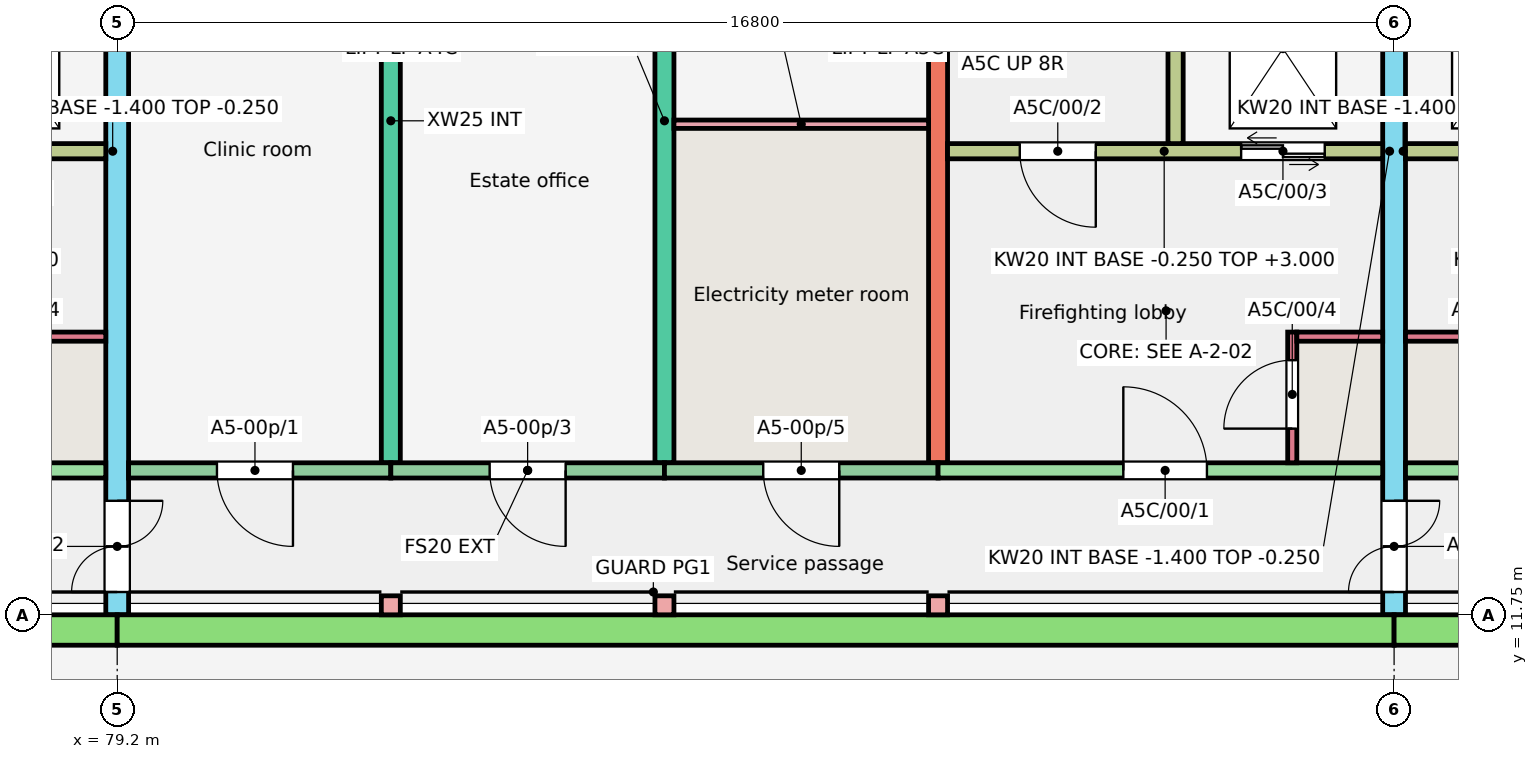
"""IFC4 building model, lengths in metres.
Left out: names, types, materials, properties, quantities, classifications, styles, units other than length and angle.
Written with IfcOpenShell. Run it as: python <this file> out.ifc"""

import sys

from ifc_helpers import new_model, si_unit, direction, frame, frame_2d, origin, origin_2d, place, context, subcontext, project, spatial, rectangle, extrude, element, fill, save


model = new_model("IFC4")
c1 = context("Model", 3, precision=1e-05, world=origin(), true_north=direction((0.0, 1.0)))
c2 = subcontext(c1, "Body", "Model", "MODEL_VIEW")
j1 = project(units=[si_unit("LENGTHUNIT", "METRE"), si_unit("PLANEANGLEUNIT", "RADIAN")], contexts=[c1])
p1 = place(None, origin())
s1 = spatial("IfcSite", under=j1, at=p1, CompositionType="ELEMENT")
p2 = place(p1, origin())
s2 = spatial("IfcBuilding", under=s1, at=p2, CompositionType="ELEMENT")
p3 = place(p2, origin())
s3 = spatial("IfcBuildingStorey", under=s2, at=p3, CompositionType="ELEMENT", Elevation=0.0)
p4 = place(p3, frame((79.2, 11.75, -0.25), z_axis=(0.0, 0.0, 1.0), x_axis=(0.0, 1.0, 0.0)))
e1 = element("IfcWall", 1, at=p4, inside=s3, PredefinedType="SHEAR", context=c2, shape_type="SweptSolid", body=[
    extrude(rectangle(XDim=11.0, YDim=0.3, at=frame_2d((5.5, 0.0))), origin(), (0.0, 0.0, 1.0), 3.25),
])
p5 = place(p4, frame((0.3, 0.0, 0.25)))
e2 = element("IfcOpeningElement", 2, at=p5, cuts=e1, PredefinedType="OPENING", context=c2, shape_type="SweptSolid", body=[
    extrude(rectangle(XDim=1.2, YDim=2.1, at=frame_2d((0.6, 1.05))), frame((0.0, 0.16, 0.0), z_axis=(0.0, -1.0, 0.0), x_axis=(1.0, 0.0, 0.0)), (0.0, 0.0, 1.0), 0.32),
])
for number, where, z_axis, x_axis in (
    (3, (82.8, 13.75, -0.25), (0.0, 0.0, 1.0), (0.0, 1.0, 0.0)),
    (4, (86.4, 13.75, -0.25), (0.0, 0.0, 1.0), (0.0, 1.0, 0.0)),
    (5, (90.0, 13.75, -0.25), (0.0, 0.0, 1.0), (0.0, 1.0, 0.0)),
):
    element("IfcWall", number, at=place(p3, frame(where, z_axis=z_axis, x_axis=x_axis)), inside=s3, PredefinedType="SHEAR", context=c2, shape_type="SweptSolid", body=[
        extrude(rectangle(XDim=9.0, YDim=0.25, at=frame_2d((4.5, 0.0))), origin(), (0.0, 0.0, 1.0), 3.25),
    ])
p6 = place(p3, frame((96.0, 11.75, -0.25), z_axis=(0.0, 0.0, 1.0), x_axis=(0.0, 1.0, 0.0)))
e6 = element("IfcWall", 6, at=p6, inside=s3, PredefinedType="SHEAR", context=c2, shape_type="SweptSolid", body=[
    extrude(rectangle(XDim=11.0, YDim=0.3, at=frame_2d((5.5, 0.0))), origin(), (0.0, 0.0, 1.0), 3.25),
])
p7 = place(p6, frame((0.3, 0.0, 0.25)))
e7 = element("IfcOpeningElement", 7, at=p7, cuts=e6, PredefinedType="OPENING", context=c2, shape_type="SweptSolid", body=[
    extrude(rectangle(XDim=1.2, YDim=2.1, at=frame_2d((0.6, 1.05))), frame((0.0, 0.16, 0.0), z_axis=(0.0, -1.0, 0.0), x_axis=(1.0, 0.0, 0.0)), (0.0, 0.0, 1.0), 0.32),
])
p8 = place(p3, frame((73.2, 13.65, -0.25), z_axis=(0.0, 0.0, 1.0), x_axis=(1.0, 0.0, 0.0)))
e8 = element("IfcWall", 8, at=p8, inside=s3, PredefinedType="SHEAR", context=c2, shape_type="SweptSolid", body=[
    extrude(rectangle(XDim=5.85, YDim=0.2, at=frame_2d((2.925, 0.0))), origin(), (0.0, 0.0, 1.0), 3.25),
])
p9 = place(p8, frame((2.438, 0.0, 0.25)))
e9 = element("IfcOpeningElement", 9, at=p9, cuts=e8, PredefinedType="OPENING", context=c2, shape_type="SweptSolid", body=[
    extrude(rectangle(XDim=1.1, YDim=2.1, at=frame_2d((0.55, 1.05))), frame((0.0, 0.11, 0.0), z_axis=(0.0, -1.0, 0.0), x_axis=(1.0, 0.0, 0.0)), (0.0, 0.0, 1.0), 0.22),
])
p10 = place(p3, frame((73.325, 17.85, -0.25), z_axis=(0.0, 0.0, 1.0), x_axis=(1.0, 0.0, 0.0)))
e10 = element("IfcWall", 10, at=p10, inside=s3, PredefinedType="SHEAR", context=c2, shape_type="SweptSolid", body=[
    extrude(rectangle(XDim=5.725, YDim=0.2, at=frame_2d((2.863, 0.0))), origin(), (0.0, 0.0, 1.0), 3.25),
])
p11 = place(p10, frame((0.95, 0.0, 0.25)))
e11 = element("IfcOpeningElement", 11, at=p11, cuts=e10, PredefinedType="OPENING", context=c2, shape_type="SweptSolid", body=[
    extrude(rectangle(XDim=1.0, YDim=2.1, at=frame_2d((0.5, 1.05))), frame((0.0, 0.11, 0.0), z_axis=(0.0, -1.0, 0.0), x_axis=(1.0, 0.0, 0.0)), (0.0, 0.0, 1.0), 0.22),
])
p12 = place(p10, frame((3.863, 0.0, 0.25)))
e12 = element("IfcOpeningElement", 12, at=p12, cuts=e10, PredefinedType="OPENING", context=c2, shape_type="SweptSolid", body=[
    extrude(rectangle(XDim=1.1, YDim=2.1, at=frame_2d((0.55, 1.05))), frame((0.0, 0.11, 0.0), z_axis=(0.0, -1.0, 0.0), x_axis=(1.0, 0.0, 0.0)), (0.0, 0.0, 1.0), 0.22),
])
p13 = place(p3, frame((77.92, 15.41, -0.25), z_axis=(0.0, 0.0, 1.0), x_axis=(1.0, 0.0, 0.0)))
e13 = element("IfcWall", 13, at=p13, inside=s3, PredefinedType="SHEAR", context=c2, shape_type="SweptSolid", body=[
    extrude(rectangle(XDim=1.13, YDim=0.12, at=frame_2d((0.565, 0.0))), origin(), (0.0, 0.0, 1.0), 3.25),
])
p14 = place(p3, frame((79.35, 13.65, -0.25), z_axis=(0.0, 0.0, 1.0), x_axis=(1.0, 0.0, 0.0)))
e14 = element("IfcWall", 14, at=p14, inside=s3, PredefinedType="SOLIDWALL", context=c2, shape_type="SweptSolid", body=[
    extrude(rectangle(XDim=3.45, YDim=0.2, at=frame_2d((1.725, 0.0))), origin(), (0.0, 0.0, 1.0), 3.25),
])
p15 = place(p14, frame((1.163, 0.0, 0.25)))
e15 = element("IfcOpeningElement", 15, at=p15, cuts=e14, PredefinedType="OPENING", context=c2, shape_type="SweptSolid", body=[
    extrude(rectangle(XDim=1.0, YDim=2.1, at=frame_2d((0.5, 1.05))), frame((0.0, 0.11, 0.0), z_axis=(0.0, -1.0, 0.0), x_axis=(1.0, 0.0, 0.0)), (0.0, 0.0, 1.0), 0.22),
])
p16 = place(p3, frame((82.8, 13.65, -0.25), z_axis=(0.0, 0.0, 1.0), x_axis=(1.0, 0.0, 0.0)))
e16 = element("IfcWall", 16, at=p16, inside=s3, PredefinedType="SOLIDWALL", context=c2, shape_type="SweptSolid", body=[
    extrude(rectangle(XDim=3.6, YDim=0.2, at=frame_2d((1.8, 0.0))), origin(), (0.0, 0.0, 1.0), 3.25),
])
p17 = place(p16, frame((1.3, 0.0, 0.25)))
e17 = element("IfcOpeningElement", 17, at=p17, cuts=e16, PredefinedType="OPENING", context=c2, shape_type="SweptSolid", body=[
    extrude(rectangle(XDim=1.0, YDim=2.1, at=frame_2d((0.5, 1.05))), frame((0.0, 0.11, 0.0), z_axis=(0.0, -1.0, 0.0), x_axis=(1.0, 0.0, 0.0)), (0.0, 0.0, 1.0), 0.22),
])
p18 = place(p3, frame((86.4, 13.65, -0.25), z_axis=(0.0, 0.0, 1.0), x_axis=(1.0, 0.0, 0.0)))
e18 = element("IfcWall", 18, at=p18, inside=s3, PredefinedType="SOLIDWALL", context=c2, shape_type="SweptSolid", body=[
    extrude(rectangle(XDim=3.6, YDim=0.2, at=frame_2d((1.8, 0.0))), origin(), (0.0, 0.0, 1.0), 3.25),
])
p19 = place(p18, frame((1.3, 0.0, 0.25)))
e19 = element("IfcOpeningElement", 19, at=p19, cuts=e18, PredefinedType="OPENING", context=c2, shape_type="SweptSolid", body=[
    extrude(rectangle(XDim=1.0, YDim=2.1, at=frame_2d((0.5, 1.05))), frame((0.0, 0.11, 0.0), z_axis=(0.0, -1.0, 0.0), x_axis=(1.0, 0.0, 0.0)), (0.0, 0.0, 1.0), 0.22),
])
p20 = place(p3, frame((90.0, 13.65, -0.25), z_axis=(0.0, 0.0, 1.0), x_axis=(1.0, 0.0, 0.0)))
e20 = element("IfcWall", 20, at=p20, inside=s3, PredefinedType="SHEAR", context=c2, shape_type="SweptSolid", body=[
    extrude(rectangle(XDim=5.85, YDim=0.2, at=frame_2d((2.925, 0.0))), origin(), (0.0, 0.0, 1.0), 3.25),
])
p21 = place(p20, frame((2.438, 0.0, 0.25)))
e21 = element("IfcOpeningElement", 21, at=p21, cuts=e20, PredefinedType="OPENING", context=c2, shape_type="SweptSolid", body=[
    extrude(rectangle(XDim=1.1, YDim=2.1, at=frame_2d((0.55, 1.05))), frame((0.0, 0.11, 0.0), z_axis=(0.0, -1.0, 0.0), x_axis=(1.0, 0.0, 0.0)), (0.0, 0.0, 1.0), 0.22),
])
p22 = place(p3, frame((90.125, 17.85, -0.25), z_axis=(0.0, 0.0, 1.0), x_axis=(1.0, 0.0, 0.0)))
e22 = element("IfcWall", 22, at=p22, inside=s3, PredefinedType="SHEAR", context=c2, shape_type="SweptSolid", body=[
    extrude(rectangle(XDim=5.725, YDim=0.2, at=frame_2d((2.863, 0.0))), origin(), (0.0, 0.0, 1.0), 3.25),
])
p23 = place(p22, frame((0.95, 0.0, 0.25)))
e23 = element("IfcOpeningElement", 23, at=p23, cuts=e22, PredefinedType="OPENING", context=c2, shape_type="SweptSolid", body=[
    extrude(rectangle(XDim=1.0, YDim=2.1, at=frame_2d((0.5, 1.05))), frame((0.0, 0.11, 0.0), z_axis=(0.0, -1.0, 0.0), x_axis=(1.0, 0.0, 0.0)), (0.0, 0.0, 1.0), 0.22),
])
p24 = place(p22, frame((3.863, 0.0, 0.25)))
e24 = element("IfcOpeningElement", 24, at=p24, cuts=e22, PredefinedType="OPENING", context=c2, shape_type="SweptSolid", body=[
    extrude(rectangle(XDim=1.1, YDim=2.1, at=frame_2d((0.55, 1.05))), frame((0.0, 0.11, 0.0), z_axis=(0.0, -1.0, 0.0), x_axis=(1.0, 0.0, 0.0)), (0.0, 0.0, 1.0), 0.22),
])
p25 = place(p3, frame((93.125, 17.95, -0.25), z_axis=(0.0, 0.0, 1.0), x_axis=(0.0, 1.0, 0.0)))
e25 = element("IfcWall", 25, at=p25, inside=s3, PredefinedType="SHEAR", context=c2, shape_type="SweptSolid", body=[
    extrude(rectangle(XDim=4.8, YDim=0.2, at=frame_2d((2.4, 0.0))), origin(), (0.0, 0.0, 1.0), 3.25),
])
p26 = place(p3, frame((94.66, 13.75, -0.25), z_axis=(0.0, 0.0, 1.0), x_axis=(0.0, 1.0, 0.0)))
e26 = element("IfcWall", 26, at=p26, inside=s3, PredefinedType="SHEAR", context=c2, shape_type="SweptSolid", body=[
    extrude(rectangle(XDim=1.72, YDim=0.12, at=frame_2d((0.86, 0.0))), origin(), (0.0, 0.0, 1.0), 3.25),
])
p27 = place(p26, frame((0.45, 0.0, 0.25)))
e27 = element("IfcOpeningElement", 27, at=p27, cuts=e26, PredefinedType="OPENING", context=c2, shape_type="SweptSolid", body=[
    extrude(rectangle(XDim=0.9, YDim=2.1, at=frame_2d((0.45, 1.05))), frame((0.0, 0.07, 0.0), z_axis=(0.0, -1.0, 0.0), x_axis=(1.0, 0.0, 0.0)), (0.0, 0.0, 1.0), 0.14),
])
p28 = place(p3, frame((94.72, 15.41, -0.25), z_axis=(0.0, 0.0, 1.0), x_axis=(1.0, 0.0, 0.0)))
e28 = element("IfcWall", 28, at=p28, inside=s3, PredefinedType="SHEAR", context=c2, shape_type="SweptSolid", body=[
    extrude(rectangle(XDim=1.13, YDim=0.12, at=frame_2d((0.565, 0.0))), origin(), (0.0, 0.0, 1.0), 3.25),
])
p29 = place(p3, frame((96.15, 13.65, -0.25), z_axis=(0.0, 0.0, 1.0), x_axis=(1.0, 0.0, 0.0)))
e29 = element("IfcWall", 29, at=p29, inside=s3, PredefinedType="SHEAR", context=c2, shape_type="SweptSolid", body=[
    extrude(rectangle(XDim=5.85, YDim=0.2, at=frame_2d((2.925, 0.0))), origin(), (0.0, 0.0, 1.0), 3.25),
])
p30 = place(p29, frame((2.312, 0.0, 0.25)))
e30 = element("IfcOpeningElement", 30, at=p30, cuts=e29, PredefinedType="OPENING", context=c2, shape_type="SweptSolid", body=[
    extrude(rectangle(XDim=1.1, YDim=2.1, at=frame_2d((0.55, 1.05))), frame((0.0, 0.11, 0.0), z_axis=(0.0, -1.0, 0.0), x_axis=(1.0, 0.0, 0.0)), (0.0, 0.0, 1.0), 0.22),
])
p31 = place(p3, frame((96.15, 17.85, -0.25), z_axis=(0.0, 0.0, 1.0), x_axis=(1.0, 0.0, 0.0)))
e31 = element("IfcWall", 31, at=p31, inside=s3, PredefinedType="SHEAR", context=c2, shape_type="SweptSolid", body=[
    extrude(rectangle(XDim=5.725, YDim=0.2, at=frame_2d((2.863, 0.0))), origin(), (0.0, 0.0, 1.0), 3.25),
])
p32 = place(p31, frame((3.775, 0.0, 0.25)))
e32 = element("IfcOpeningElement", 32, at=p32, cuts=e31, PredefinedType="OPENING", context=c2, shape_type="SweptSolid", body=[
    extrude(rectangle(XDim=1.0, YDim=2.1, at=frame_2d((0.5, 1.05))), frame((0.0, 0.11, 0.0), z_axis=(0.0, -1.0, 0.0), x_axis=(1.0, 0.0, 0.0)), (0.0, 0.0, 1.0), 0.22),
])
p33 = place(p31, frame((0.762, 0.0, 0.25)))
e33 = element("IfcOpeningElement", 33, at=p33, cuts=e31, PredefinedType="OPENING", context=c2, shape_type="SweptSolid", body=[
    extrude(rectangle(XDim=1.1, YDim=2.1, at=frame_2d((0.55, 1.05))), frame((0.0, 0.11, 0.0), z_axis=(0.0, -1.0, 0.0), x_axis=(1.0, 0.0, 0.0)), (0.0, 0.0, 1.0), 0.22),
])
p34 = place(p3, frame((96.15, 15.41, -0.25), z_axis=(0.0, 0.0, 1.0), x_axis=(1.0, 0.0, 0.0)))
e34 = element("IfcWall", 34, at=p34, inside=s3, PredefinedType="SHEAR", context=c2, shape_type="SweptSolid", body=[
    extrude(rectangle(XDim=1.13, YDim=0.12, at=frame_2d((0.565, 0.0))), origin(), (0.0, 0.0, 1.0), 3.25),
])
for number, where, z_axis, x_axis in (
    (35, (82.8, 11.875, -0.25), (0.0, 0.0, 1.0), (1.0, 0.0, 0.0)),
    (36, (86.4, 11.875, -0.25), (0.0, 0.0, 1.0), (1.0, 0.0, 0.0)),
    (37, (90.0, 11.875, -0.25), (0.0, 0.0, 1.0), (1.0, 0.0, 0.0)),
):
    element("IfcColumn", number, at=place(p3, frame(where, z_axis=z_axis, x_axis=x_axis)), inside=s3, PredefinedType="COLUMN", context=c2, shape_type="SweptSolid", body=[
        extrude(rectangle(XDim=0.25, YDim=0.25, at=origin_2d()), origin(), (0.0, 0.0, 1.0), 3.25),
    ])
p35 = place(p3, frame((76.225, 17.85, -1.4), z_axis=(0.0, 0.0, 1.0), x_axis=(1.0, 0.0, 0.0)))
e38 = element("IfcWall", 38, at=p35, inside=s3, PredefinedType="SHEAR", context=c2, shape_type="SweptSolid", body=[
    extrude(rectangle(XDim=2.975, YDim=0.2, at=frame_2d((1.487, 0.0))), origin(), (0.0, 0.0, 1.0), 1.15),
])
p36 = place(p3, frame((79.125, 17.95, -1.4), z_axis=(0.0, 0.0, 1.0), x_axis=(0.0, 1.0, 0.0)))
e39 = element("IfcWall", 39, at=p36, inside=s3, PredefinedType="SHEAR", context=c2, shape_type="SweptSolid", body=[
    extrude(rectangle(XDim=3.0, YDim=0.15, at=frame_2d((1.5, 0.0))), origin(), (0.0, 0.0, 1.0), 1.15),
])
p37 = place(p3, frame((93.025, 17.85, -1.4), z_axis=(0.0, 0.0, 1.0), x_axis=(1.0, 0.0, 0.0)))
e40 = element("IfcWall", 40, at=p37, inside=s3, PredefinedType="SHEAR", context=c2, shape_type="SweptSolid", body=[
    extrude(rectangle(XDim=2.975, YDim=0.2, at=frame_2d((1.488, 0.0))), origin(), (0.0, 0.0, 1.0), 1.15),
])
p38 = place(p3, frame((93.125, 17.95, -1.4), z_axis=(0.0, 0.0, 1.0), x_axis=(0.0, 1.0, 0.0)))
e41 = element("IfcWall", 41, at=p38, inside=s3, PredefinedType="SHEAR", context=c2, shape_type="SweptSolid", body=[
    extrude(rectangle(XDim=3.0, YDim=0.2, at=frame_2d((1.5, 0.0))), origin(), (0.0, 0.0, 1.0), 1.15),
])
p39 = place(p3, frame((95.925, 17.95, -1.4), z_axis=(0.0, 0.0, 1.0), x_axis=(0.0, 1.0, 0.0)))
e42 = element("IfcWall", 42, at=p39, inside=s3, PredefinedType="SHEAR", context=c2, shape_type="SweptSolid", body=[
    extrude(rectangle(XDim=3.0, YDim=0.15, at=frame_2d((1.5, 0.0))), origin(), (0.0, 0.0, 1.0), 1.15),
])
p40 = place(p3, frame((96.0, 17.85, -1.4), z_axis=(0.0, 0.0, 1.0), x_axis=(1.0, 0.0, 0.0)))
e43 = element("IfcWall", 43, at=p40, inside=s3, PredefinedType="SHEAR", context=c2, shape_type="SweptSolid", body=[
    extrude(rectangle(XDim=2.975, YDim=0.2, at=frame_2d((1.488, 0.0))), origin(), (0.0, 0.0, 1.0), 1.15),
])
p41 = place(p3, frame((96.075, 17.95, -1.4), z_axis=(0.0, 0.0, 1.0), x_axis=(0.0, 1.0, 0.0)))
e44 = element("IfcWall", 44, at=p41, inside=s3, PredefinedType="SHEAR", context=c2, shape_type="SweptSolid", body=[
    extrude(rectangle(XDim=3.0, YDim=0.15, at=frame_2d((1.5, 0.0))), origin(), (0.0, 0.0, 1.0), 1.15),
])
for number, where, z_axis, x_axis in (
    (45, (62.4, 11.55, -0.25), (0.0, 0.0, 1.0), (1.0, 0.0, 0.0)),
    (46, (79.2, 11.55, -0.25), (0.0, 0.0, 1.0), (1.0, 0.0, 0.0)),
    (47, (96.0, 11.55, -0.25), (0.0, 0.0, 1.0), (1.0, 0.0, 0.0)),
):
    element("IfcWall", number, at=place(p3, frame(where, z_axis=z_axis, x_axis=x_axis)), inside=s3, PredefinedType="SOLIDWALL", context=c2, shape_type="SweptSolid", body=[
        extrude(rectangle(XDim=16.8, YDim=0.4, at=frame_2d((8.4, 0.0))), origin(), (0.0, 0.0, 1.0), 3.25),
    ])
p42 = place(p3, frame((86.525, 18.205, 0.0), z_axis=(0.0, 0.0, 1.0), x_axis=(1.0, 0.0, 0.0)))
e48 = element("IfcWall", 48, at=p42, inside=s3, PredefinedType="PARTITIONING", context=c2, shape_type="SweptSolid", body=[
    extrude(rectangle(XDim=3.35, YDim=0.11, at=frame_2d((1.675, 0.0))), origin(), (0.0, 0.0, 1.0), 2.8),
])
p43 = place(p15, origin())
e49 = element("IfcDoor", 49, at=p43, inside=s3, OperationType="SINGLE_SWING_RIGHT", PredefinedType="DOOR", context=c2, shape_type="SweptSolid", body=[
    extrude(rectangle(XDim=1.0, YDim=2.1, at=frame_2d((0.5, 1.05))), frame((0.0, 0.025, 0.0), z_axis=(0.0, -1.0, 0.0), x_axis=(1.0, 0.0, 0.0)), (0.0, 0.0, 1.0), 0.05),
])
fill(e15, e49)
p44 = place(p17, origin())
e50 = element("IfcDoor", 50, at=p44, inside=s3, OperationType="SINGLE_SWING_RIGHT", PredefinedType="DOOR", context=c2, shape_type="SweptSolid", body=[
    extrude(rectangle(XDim=1.0, YDim=2.1, at=frame_2d((0.5, 1.05))), frame((0.0, 0.025, 0.0), z_axis=(0.0, -1.0, 0.0), x_axis=(1.0, 0.0, 0.0)), (0.0, 0.0, 1.0), 0.05),
])
fill(e17, e50)
p45 = place(p19, origin())
e51 = element("IfcDoor", 51, at=p45, inside=s3, OperationType="SINGLE_SWING_RIGHT", PredefinedType="DOOR", context=c2, shape_type="SweptSolid", body=[
    extrude(rectangle(XDim=1.0, YDim=2.1, at=frame_2d((0.5, 1.05))), frame((0.0, 0.025, 0.0), z_axis=(0.0, -1.0, 0.0), x_axis=(1.0, 0.0, 0.0)), (0.0, 0.0, 1.0), 0.05),
])
fill(e19, e51)
p46 = place(p21, origin())
e52 = element("IfcDoor", 52, at=p46, inside=s3, OperationType="SINGLE_SWING_LEFT", PredefinedType="DOOR", context=c2, shape_type="SweptSolid", body=[
    extrude(rectangle(XDim=1.1, YDim=2.1, at=frame_2d((0.55, 1.05))), frame((0.0, 0.025, 0.0), z_axis=(0.0, -1.0, 0.0), x_axis=(1.0, 0.0, 0.0)), (0.0, 0.0, 1.0), 0.05),
])
fill(e21, e52)
p47 = place(p23, origin())
e53 = element("IfcDoor", 53, at=p47, inside=s3, OperationType="SINGLE_SWING_RIGHT", PredefinedType="DOOR", context=c2, shape_type="SweptSolid", body=[
    extrude(rectangle(XDim=1.0, YDim=2.1, at=frame_2d((0.5, 1.05))), frame((0.0, 0.025, 0.0), z_axis=(0.0, -1.0, 0.0), x_axis=(1.0, 0.0, 0.0)), (0.0, 0.0, 1.0), 0.05),
])
fill(e23, e53)
p48 = place(p24, origin())
e54 = element("IfcDoor", 54, at=p48, inside=s3, OperationType="DOUBLE_DOOR_SLIDING", PredefinedType="DOOR", context=c2, shape_type="SweptSolid", body=[
    extrude(rectangle(XDim=1.1, YDim=2.1, at=frame_2d((0.55, 1.05))), frame((0.0, 0.025, 0.0), z_axis=(0.0, -1.0, 0.0), x_axis=(1.0, 0.0, 0.0)), (0.0, 0.0, 1.0), 0.05),
])
fill(e24, e54)
p49 = place(p27, origin())
e55 = element("IfcDoor", 55, at=p49, inside=s3, OperationType="SINGLE_SWING_LEFT", PredefinedType="DOOR", context=c2, shape_type="SweptSolid", body=[
    extrude(rectangle(XDim=0.9, YDim=2.1, at=frame_2d((0.45, 1.05))), frame((0.0, 0.025, 0.0), z_axis=(0.0, -1.0, 0.0), x_axis=(1.0, 0.0, 0.0)), (0.0, 0.0, 1.0), 0.05),
])
fill(e27, e55)
p50 = place(p5, origin())
e56 = element("IfcDoor", 56, at=p50, inside=s3, OperationType="DOUBLE_DOOR_SINGLE_SWING", PredefinedType="DOOR", context=c2, shape_type="SweptSolid", body=[
    extrude(rectangle(XDim=1.2, YDim=2.1, at=frame_2d((0.6, 1.05))), frame((0.0, 0.025, 0.0), z_axis=(0.0, -1.0, 0.0), x_axis=(1.0, 0.0, 0.0)), (0.0, 0.0, 1.0), 0.05),
])
fill(e2, e56)
p51 = place(p7, origin())
e57 = element("IfcDoor", 57, at=p51, inside=s3, OperationType="DOUBLE_DOOR_SINGLE_SWING", PredefinedType="DOOR", context=c2, shape_type="SweptSolid", body=[
    extrude(rectangle(XDim=1.2, YDim=2.1, at=frame_2d((0.6, 1.05))), frame((0.0, 0.025, 0.0), z_axis=(0.0, -1.0, 0.0), x_axis=(1.0, 0.0, 0.0)), (0.0, 0.0, 1.0), 0.05),
])
fill(e7, e57)
save(model, sys.argv[1])
